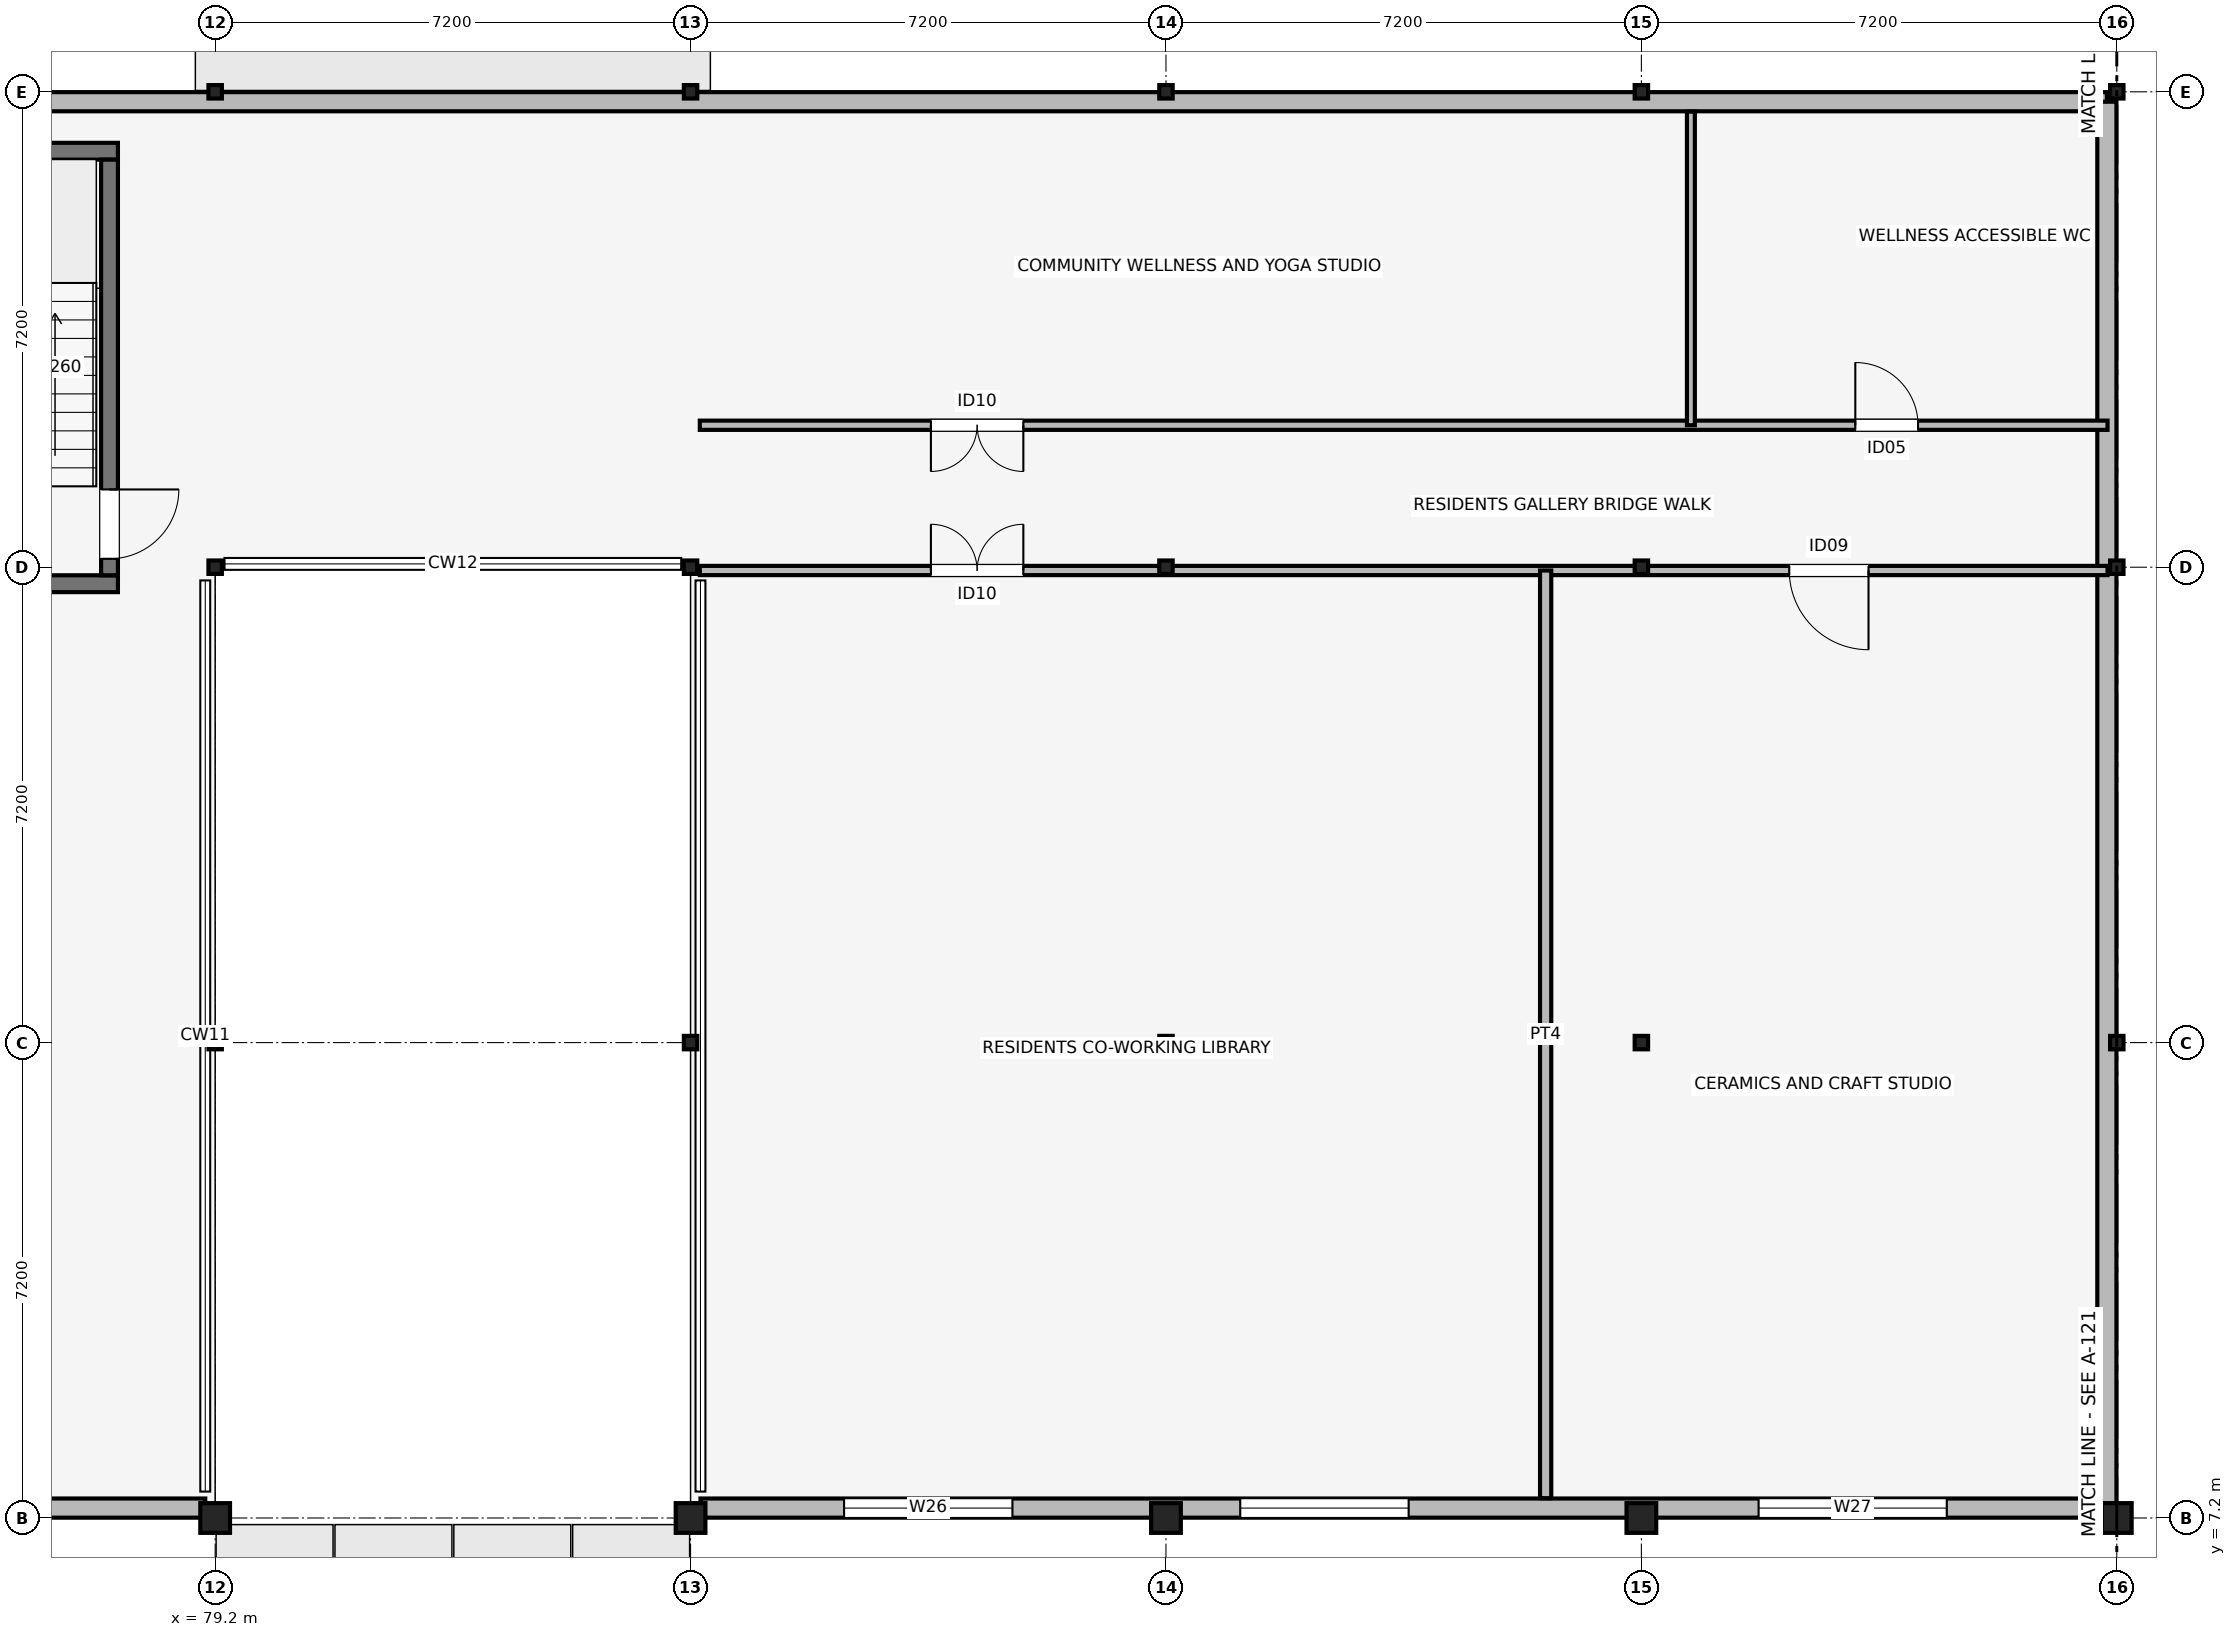
"""IFC4 building model, lengths in metres.
Left out: names, types, materials, properties, quantities, classifications, styles, units other than length and angle.
Written with IfcOpenShell. Run it as: python <this file> out.ifc"""

import sys

from ifc_helpers import new_model, si_unit, direction, frame, frame_2d, origin, origin_2d, place, context, subcontext, project, spatial, rectangle, circle, i_section, extrude, element, fill, save


model = new_model("IFC4")
c1 = context("Model", 3, precision=1e-05, world=origin(), true_north=direction((0.0, 1.0)))
c2 = subcontext(c1, "Body", "Model", "MODEL_VIEW")
j1 = project(units=[si_unit("LENGTHUNIT", "METRE"), si_unit("PLANEANGLEUNIT", "RADIAN")], contexts=[c1])
p1 = place(None, origin())
s1 = spatial("IfcSite", under=j1, at=p1, CompositionType="ELEMENT")
p2 = place(p1, origin())
s2 = spatial("IfcBuilding", under=s1, at=p2, CompositionType="ELEMENT")
p3 = place(p2, frame((0.0, 0.0, 4.5)))
s3 = spatial("IfcBuildingStorey", under=s2, at=p3, CompositionType="ELEMENT", Elevation=4.5)
p4 = place(p3, frame((79.2, 7.2, 0.0), z_axis=(0.0, 0.0, 1.0), x_axis=(1.0, 0.0, 0.0)))
e1 = element("IfcColumn", 1, at=p4, inside=s3, PredefinedType="COLUMN", context=c2, shape_type="SweptSolid", body=[
    extrude(circle(Radius=0.225, at=origin_2d()), origin(), (0.0, 0.0, 1.0), 4.2),
])
for number, where, z_axis, x_axis in (
    (2, (79.2, 14.4, 0.0), (0.0, 0.0, 1.0), (1.0, 0.0, 0.0)),
    (3, (79.2, 21.6, 0.0), (0.0, 0.0, 1.0), (1.0, 0.0, 0.0)),
    (4, (79.2, 28.8, 0.0), (0.0, 0.0, 1.0), (1.0, 0.0, 0.0)),
):
    element("IfcColumn", number, at=place(p3, frame(where, z_axis=z_axis, x_axis=x_axis)), inside=s3, PredefinedType="COLUMN", context=c2, shape_type="SweptSolid", body=[
        extrude(i_section(OverallWidth=0.203, OverallDepth=0.203, WebThickness=0.007, FlangeThickness=0.011, FilletRadius=0.01, at=origin_2d()), origin(), (0.0, 0.0, 1.0), 4.2),
    ])
p5 = place(p3, frame((86.4, 7.2, 0.0), z_axis=(0.0, 0.0, 1.0), x_axis=(1.0, 0.0, 0.0)))
e5 = element("IfcColumn", 5, at=p5, inside=s3, PredefinedType="COLUMN", context=c2, shape_type="SweptSolid", body=[
    extrude(circle(Radius=0.225, at=origin_2d()), origin(), (0.0, 0.0, 1.0), 4.2),
])
for number, where, z_axis, x_axis in (
    (6, (86.4, 14.4, 0.0), (0.0, 0.0, 1.0), (1.0, 0.0, 0.0)),
    (7, (86.4, 21.6, 0.0), (0.0, 0.0, 1.0), (1.0, 0.0, 0.0)),
    (8, (86.4, 28.8, 0.0), (0.0, 0.0, 1.0), (1.0, 0.0, 0.0)),
):
    element("IfcColumn", number, at=place(p3, frame(where, z_axis=z_axis, x_axis=x_axis)), inside=s3, PredefinedType="COLUMN", context=c2, shape_type="SweptSolid", body=[
        extrude(i_section(OverallWidth=0.203, OverallDepth=0.203, WebThickness=0.007, FlangeThickness=0.011, FilletRadius=0.01, at=origin_2d()), origin(), (0.0, 0.0, 1.0), 4.2),
    ])
p6 = place(p3, frame((93.6, 7.2, 0.0), z_axis=(0.0, 0.0, 1.0), x_axis=(1.0, 0.0, 0.0)))
e9 = element("IfcColumn", 9, at=p6, inside=s3, PredefinedType="COLUMN", context=c2, shape_type="SweptSolid", body=[
    extrude(circle(Radius=0.225, at=origin_2d()), origin(), (0.0, 0.0, 1.0), 4.2),
])
for number, where, z_axis, x_axis in (
    (10, (93.6, 14.4, 0.0), (0.0, 0.0, 1.0), (1.0, 0.0, 0.0)),
    (11, (93.6, 21.6, 0.0), (0.0, 0.0, 1.0), (1.0, 0.0, 0.0)),
    (12, (93.6, 28.8, 0.0), (0.0, 0.0, 1.0), (1.0, 0.0, 0.0)),
):
    element("IfcColumn", number, at=place(p3, frame(where, z_axis=z_axis, x_axis=x_axis)), inside=s3, PredefinedType="COLUMN", context=c2, shape_type="SweptSolid", body=[
        extrude(i_section(OverallWidth=0.203, OverallDepth=0.203, WebThickness=0.007, FlangeThickness=0.011, FilletRadius=0.01, at=origin_2d()), origin(), (0.0, 0.0, 1.0), 4.2),
    ])
p7 = place(p3, frame((100.8, 7.2, 0.0), z_axis=(0.0, 0.0, 1.0), x_axis=(1.0, 0.0, 0.0)))
e13 = element("IfcColumn", 13, at=p7, inside=s3, PredefinedType="COLUMN", context=c2, shape_type="SweptSolid", body=[
    extrude(circle(Radius=0.225, at=origin_2d()), origin(), (0.0, 0.0, 1.0), 4.2),
])
for number, where, z_axis, x_axis in (
    (14, (100.8, 14.4, 0.0), (0.0, 0.0, 1.0), (1.0, 0.0, 0.0)),
    (15, (100.8, 21.6, 0.0), (0.0, 0.0, 1.0), (1.0, 0.0, 0.0)),
    (16, (100.8, 28.8, 0.0), (0.0, 0.0, 1.0), (1.0, 0.0, 0.0)),
):
    element("IfcColumn", number, at=place(p3, frame(where, z_axis=z_axis, x_axis=x_axis)), inside=s3, PredefinedType="COLUMN", context=c2, shape_type="SweptSolid", body=[
        extrude(i_section(OverallWidth=0.203, OverallDepth=0.203, WebThickness=0.007, FlangeThickness=0.011, FilletRadius=0.01, at=origin_2d()), origin(), (0.0, 0.0, 1.0), 4.2),
    ])
p8 = place(p3, frame((108.0, 7.2, 0.0), z_axis=(0.0, 0.0, 1.0), x_axis=(1.0, 0.0, 0.0)))
e17 = element("IfcColumn", 17, at=p8, inside=s3, PredefinedType="COLUMN", context=c2, shape_type="SweptSolid", body=[
    extrude(circle(Radius=0.225, at=origin_2d()), origin(), (0.0, 0.0, 1.0), 4.2),
])
for number, where, z_axis, x_axis in (
    (18, (108.0, 14.4, 0.0), (0.0, 0.0, 1.0), (1.0, 0.0, 0.0)),
    (19, (108.0, 21.6, 0.0), (0.0, 0.0, 1.0), (1.0, 0.0, 0.0)),
    (20, (108.0, 28.8, 0.0), (0.0, 0.0, 1.0), (1.0, 0.0, 0.0)),
):
    element("IfcColumn", number, at=place(p3, frame(where, z_axis=z_axis, x_axis=x_axis)), inside=s3, PredefinedType="COLUMN", context=c2, shape_type="SweptSolid", body=[
        extrude(i_section(OverallWidth=0.203, OverallDepth=0.203, WebThickness=0.007, FlangeThickness=0.011, FilletRadius=0.01, at=origin_2d()), origin(), (0.0, 0.0, 1.0), 4.2),
    ])
for number, where, z_axis, x_axis in (
    (21, (74.423, 21.35, 0.0), (0.0, 0.0, 1.0), (1.0, 0.0, 0.0)),
    (22, (74.423, 27.9, 0.0), (0.0, 0.0, 1.0), (1.0, 0.0, 0.0)),
):
    element("IfcWall", number, at=place(p3, frame(where, z_axis=z_axis, x_axis=x_axis)), inside=s3, PredefinedType="SHEAR", context=c2, shape_type="SweptSolid", body=[
        extrude(rectangle(XDim=3.305, YDim=0.255, at=frame_2d((1.652, 0.0))), origin(), (0.0, 0.0, 1.0), 4.2),
    ])
p9 = place(p3, frame((77.6, 21.478, 0.0), z_axis=(0.0, 0.0, 1.0), x_axis=(0.0, 1.0, 0.0)))
e23 = element("IfcWall", 23, at=p9, inside=s3, PredefinedType="SHEAR", context=c2, shape_type="SweptSolid", body=[
    extrude(rectangle(XDim=6.295, YDim=0.255, at=frame_2d((3.147, 0.0))), origin(), (0.0, 0.0, 1.0), 4.2),
])
p10 = place(p9, frame((1.3, 0.0, 0.0), z_axis=(0.0, 0.0, 1.0), x_axis=(-1.0, 0.0, 0.0)))
e24 = element("IfcOpeningElement", 24, at=p10, cuts=e23, PredefinedType="OPENING", context=c2, shape_type="SweptSolid", body=[
    extrude(rectangle(XDim=1.05, YDim=2.12, at=frame_2d((0.525, 1.06))), frame((0.0, 0.137, 0.0), z_axis=(0.0, -1.0, 0.0), x_axis=(1.0, 0.0, 0.0)), (0.0, 0.0, 1.0), 0.275),
])
p11 = place(p3, frame((57.75, 7.35, 0.0), z_axis=(0.0, 0.0, 1.0), x_axis=(1.0, 0.0, 0.0)))
e25 = element("IfcWall", 25, at=p11, inside=s3, PredefinedType="SOLIDWALL", context=c2, shape_type="SweptSolid", body=[
    extrude(rectangle(XDim=21.3, YDim=0.29, at=frame_2d((10.65, 0.0))), origin(), (0.0, 0.0, 1.0), 2.74),
])
p12 = place(p11, frame((2.375, 0.0, 0.48)))
e26 = element("IfcOpeningElement", 26, at=p12, cuts=e25, PredefinedType="OPENING", context=c2, shape_type="SweptSolid", body=[
    extrude(rectangle(XDim=2.15, YDim=2.15, at=frame_2d((1.075, 1.075))), frame((0.0, 0.155, 0.0), z_axis=(0.0, -1.0, 0.0), x_axis=(1.0, 0.0, 0.0)), (0.0, 0.0, 1.0), 0.31),
])
p13 = place(p11, frame((9.575, 0.0, 0.48)))
e27 = element("IfcOpeningElement", 27, at=p13, cuts=e25, PredefinedType="OPENING", context=c2, shape_type="SweptSolid", body=[
    extrude(rectangle(XDim=2.15, YDim=2.15, at=frame_2d((1.075, 1.075))), frame((0.0, 0.155, 0.0), z_axis=(0.0, -1.0, 0.0), x_axis=(1.0, 0.0, 0.0)), (0.0, 0.0, 1.0), 0.31),
])
p14 = place(p11, frame((16.775, 0.0, 0.48)))
e28 = element("IfcOpeningElement", 28, at=p14, cuts=e25, PredefinedType="OPENING", context=c2, shape_type="SweptSolid", body=[
    extrude(rectangle(XDim=2.15, YDim=2.15, at=frame_2d((1.075, 1.075))), frame((0.0, 0.155, 0.0), z_axis=(0.0, -1.0, 0.0), x_axis=(1.0, 0.0, 0.0)), (0.0, 0.0, 1.0), 0.31),
])
p15 = place(p3, frame((86.55, 7.35, 0.0), z_axis=(0.0, 0.0, 1.0), x_axis=(1.0, 0.0, 0.0)))
e29 = element("IfcWall", 29, at=p15, inside=s3, PredefinedType="SOLIDWALL", context=c2, shape_type="SweptSolid", body=[
    extrude(rectangle(XDim=21.3, YDim=0.29, at=frame_2d((10.65, 0.0))), origin(), (0.0, 0.0, 1.0), 2.74),
])
p16 = place(p15, frame((2.175, 0.0, 0.48)))
e30 = element("IfcOpeningElement", 30, at=p16, cuts=e29, PredefinedType="OPENING", context=c2, shape_type="SweptSolid", body=[
    extrude(rectangle(XDim=2.55, YDim=2.15, at=frame_2d((1.275, 1.075))), frame((0.0, 0.155, 0.0), z_axis=(0.0, -1.0, 0.0), x_axis=(1.0, 0.0, 0.0)), (0.0, 0.0, 1.0), 0.31),
])
p17 = place(p15, frame((8.175, 0.0, 0.48)))
e31 = element("IfcOpeningElement", 31, at=p17, cuts=e29, PredefinedType="OPENING", context=c2, shape_type="SweptSolid", body=[
    extrude(rectangle(XDim=2.55, YDim=2.15, at=frame_2d((1.275, 1.075))), frame((0.0, 0.155, 0.0), z_axis=(0.0, -1.0, 0.0), x_axis=(1.0, 0.0, 0.0)), (0.0, 0.0, 1.0), 0.31),
])
p18 = place(p15, frame((16.025, 0.0, 0.48)))
e32 = element("IfcOpeningElement", 32, at=p18, cuts=e29, PredefinedType="OPENING", context=c2, shape_type="SweptSolid", body=[
    extrude(rectangle(XDim=2.85, YDim=2.15, at=frame_2d((1.425, 1.075))), frame((0.0, 0.155, 0.0), z_axis=(0.0, -1.0, 0.0), x_axis=(1.0, 0.0, 0.0)), (0.0, 0.0, 1.0), 0.31),
])
p19 = place(p3, frame((57.75, 28.65, 0.0), z_axis=(0.0, 0.0, 1.0), x_axis=(1.0, 0.0, 0.0)))
e33 = element("IfcWall", 33, at=p19, inside=s3, PredefinedType="SOLIDWALL", context=c2, shape_type="SweptSolid", body=[
    extrude(rectangle(XDim=50.1, YDim=0.29, at=frame_2d((25.05, 0.0))), origin(), (0.0, 0.0, 1.0), 3.253),
])
p20 = place(p3, frame((107.85, 7.35, 0.0), z_axis=(0.0, 0.0, 1.0), x_axis=(0.0, 1.0, 0.0)))
e34 = element("IfcWall", 34, at=p20, inside=s3, PredefinedType="SOLIDWALL", context=c2, shape_type="SweptSolid", body=[
    extrude(rectangle(XDim=21.3, YDim=0.29, at=frame_2d((10.65, 0.0))), origin(), (0.0, 0.0, 1.0), 2.74),
])
p21 = place(p3, frame((86.54, 21.55, 0.0), z_axis=(0.0, 0.0, 1.0), x_axis=(1.0, 0.0, 0.0)))
e35 = element("IfcWall", 35, at=p21, inside=s3, PredefinedType="PARTITIONING", context=c2, shape_type="SweptSolid", body=[
    extrude(rectangle(XDim=21.32, YDim=0.14, at=frame_2d((10.66, 0.0))), origin(), (0.0, 0.0, 1.0), 3.2),
])
p22 = place(p21, frame((3.5, 0.0, 0.0)))
e36 = element("IfcOpeningElement", 36, at=p22, cuts=e35, PredefinedType="OPENING", context=c2, shape_type="SweptSolid", body=[
    extrude(rectangle(XDim=1.4, YDim=2.22, at=frame_2d((0.7, 1.11))), frame((0.0, 0.08, 0.0), z_axis=(0.0, -1.0, 0.0), x_axis=(1.0, 0.0, 0.0)), (0.0, 0.0, 1.0), 0.16),
])
p23 = place(p21, frame((17.7, 0.0, 0.0), z_axis=(0.0, 0.0, 1.0), x_axis=(-1.0, 0.0, 0.0)))
e37 = element("IfcOpeningElement", 37, at=p23, cuts=e35, PredefinedType="OPENING", context=c2, shape_type="SweptSolid", body=[
    extrude(rectangle(XDim=1.2, YDim=2.18, at=frame_2d((0.6, 1.09))), frame((0.0, 0.08, 0.0), z_axis=(0.0, -1.0, 0.0), x_axis=(1.0, 0.0, 0.0)), (0.0, 0.0, 1.0), 0.16),
])
p24 = place(p3, frame((99.35, 7.5, 0.0), z_axis=(0.0, 0.0, 1.0), x_axis=(0.0, 1.0, 0.0)))
e38 = element("IfcWall", 38, at=p24, inside=s3, PredefinedType="PARTITIONING", context=c2, shape_type="SweptSolid", body=[
    extrude(rectangle(XDim=14.05, YDim=0.17, at=frame_2d((7.025, 0.0))), origin(), (0.0, 0.0, 1.0), 3.2),
])
p25 = place(p3, frame((86.54, 23.75, 0.0), z_axis=(0.0, 0.0, 1.0), x_axis=(1.0, 0.0, 0.0)))
e39 = element("IfcWall", 39, at=p25, inside=s3, PredefinedType="PARTITIONING", context=c2, shape_type="SweptSolid", body=[
    extrude(rectangle(XDim=21.32, YDim=0.14, at=frame_2d((10.66, 0.0))), origin(), (0.0, 0.0, 1.0), 3.2),
])
p26 = place(p25, frame((4.9, 0.0, 0.0), z_axis=(0.0, 0.0, 1.0), x_axis=(-1.0, 0.0, 0.0)))
e40 = element("IfcOpeningElement", 40, at=p26, cuts=e39, PredefinedType="OPENING", context=c2, shape_type="SweptSolid", body=[
    extrude(rectangle(XDim=1.4, YDim=2.22, at=frame_2d((0.7, 1.11))), frame((0.0, 0.08, 0.0), z_axis=(0.0, -1.0, 0.0), x_axis=(1.0, 0.0, 0.0)), (0.0, 0.0, 1.0), 0.16),
])
p27 = place(p25, frame((17.5, 0.0, 0.0)))
e41 = element("IfcOpeningElement", 41, at=p27, cuts=e39, PredefinedType="OPENING", context=c2, shape_type="SweptSolid", body=[
    extrude(rectangle(XDim=0.95, YDim=2.12, at=frame_2d((0.475, 1.06))), frame((0.0, 0.08, 0.0), z_axis=(0.0, -1.0, 0.0), x_axis=(1.0, 0.0, 0.0)), (0.0, 0.0, 1.0), 0.16),
])
p28 = place(p3, frame((101.55, 23.75, 0.0), z_axis=(0.0, 0.0, 1.0), x_axis=(0.0, 1.0, 0.0)))
e42 = element("IfcWall", 42, at=p28, inside=s3, PredefinedType="PARTITIONING", context=c2, shape_type="SweptSolid", body=[
    extrude(rectangle(XDim=4.75, YDim=0.12, at=frame_2d((2.375, 0.0))), origin(), (0.0, 0.0, 1.0), 3.2),
])
p29 = place(p16, origin())
e43 = element("IfcWindow", 43, at=p29, inside=s3, PartitioningType="SINGLE_PANEL", PredefinedType="WINDOW", context=c2, shape_type="SweptSolid", body=[
    extrude(rectangle(XDim=2.55, YDim=2.15, at=frame_2d((1.275, 1.075))), frame((0.0, 0.03, 0.0), z_axis=(0.0, -1.0, 0.0), x_axis=(1.0, 0.0, 0.0)), (0.0, 0.0, 1.0), 0.06),
])
fill(e30, e43)
p30 = place(p17, origin())
e44 = element("IfcWindow", 44, at=p30, inside=s3, PartitioningType="SINGLE_PANEL", PredefinedType="WINDOW", context=c2, shape_type="SweptSolid", body=[
    extrude(rectangle(XDim=2.55, YDim=2.15, at=frame_2d((1.275, 1.075))), frame((0.0, 0.03, 0.0), z_axis=(0.0, -1.0, 0.0), x_axis=(1.0, 0.0, 0.0)), (0.0, 0.0, 1.0), 0.06),
])
fill(e31, e44)
p31 = place(p18, origin())
e45 = element("IfcWindow", 45, at=p31, inside=s3, PartitioningType="SINGLE_PANEL", PredefinedType="WINDOW", context=c2, shape_type="SweptSolid", body=[
    extrude(rectangle(XDim=2.85, YDim=2.15, at=frame_2d((1.425, 1.075))), frame((0.0, 0.03, 0.0), z_axis=(0.0, -1.0, 0.0), x_axis=(1.0, 0.0, 0.0)), (0.0, 0.0, 1.0), 0.06),
])
fill(e32, e45)
p32 = place(p22, origin())
e46 = element("IfcDoor", 46, at=p32, inside=s3, OperationType="DOUBLE_DOOR_SINGLE_SWING", PredefinedType="DOOR", context=c2, shape_type="SweptSolid", body=[
    extrude(rectangle(XDim=1.4, YDim=2.22, at=frame_2d((0.7, 1.11))), frame((0.0, 0.025, 0.0), z_axis=(0.0, -1.0, 0.0), x_axis=(1.0, 0.0, 0.0)), (0.0, 0.0, 1.0), 0.05),
])
fill(e36, e46)
p33 = place(p23, origin())
e47 = element("IfcDoor", 47, at=p33, inside=s3, OperationType="SINGLE_SWING_RIGHT", PredefinedType="DOOR", context=c2, shape_type="SweptSolid", body=[
    extrude(rectangle(XDim=1.2, YDim=2.18, at=frame_2d((0.6, 1.09))), frame((0.0, 0.025, 0.0), z_axis=(0.0, -1.0, 0.0), x_axis=(1.0, 0.0, 0.0)), (0.0, 0.0, 1.0), 0.05),
])
fill(e37, e47)
p34 = place(p26, origin())
e48 = element("IfcDoor", 48, at=p34, inside=s3, OperationType="DOUBLE_DOOR_SINGLE_SWING", PredefinedType="DOOR", context=c2, shape_type="SweptSolid", body=[
    extrude(rectangle(XDim=1.4, YDim=2.22, at=frame_2d((0.7, 1.11))), frame((0.0, 0.025, 0.0), z_axis=(0.0, -1.0, 0.0), x_axis=(1.0, 0.0, 0.0)), (0.0, 0.0, 1.0), 0.05),
])
fill(e40, e48)
p35 = place(p27, origin())
e49 = element("IfcDoor", 49, at=p35, inside=s3, OperationType="SINGLE_SWING_LEFT", PredefinedType="DOOR", context=c2, shape_type="SweptSolid", body=[
    extrude(rectangle(XDim=0.95, YDim=2.12, at=frame_2d((0.475, 1.06))), frame((0.0, 0.025, 0.0), z_axis=(0.0, -1.0, 0.0), x_axis=(1.0, 0.0, 0.0)), (0.0, 0.0, 1.0), 0.05),
])
fill(e41, e49)
p36 = place(p10, origin())
e50 = element("IfcDoor", 50, at=p36, inside=s3, OperationType="SINGLE_SWING_RIGHT", PredefinedType="DOOR", context=c2, shape_type="SweptSolid", body=[
    extrude(rectangle(XDim=1.05, YDim=2.12, at=frame_2d((0.525, 1.06))), frame((0.0, 0.025, 0.0), z_axis=(0.0, -1.0, 0.0), x_axis=(1.0, 0.0, 0.0)), (0.0, 0.0, 1.0), 0.05),
])
fill(e24, e50)
save(model, sys.argv[1])
